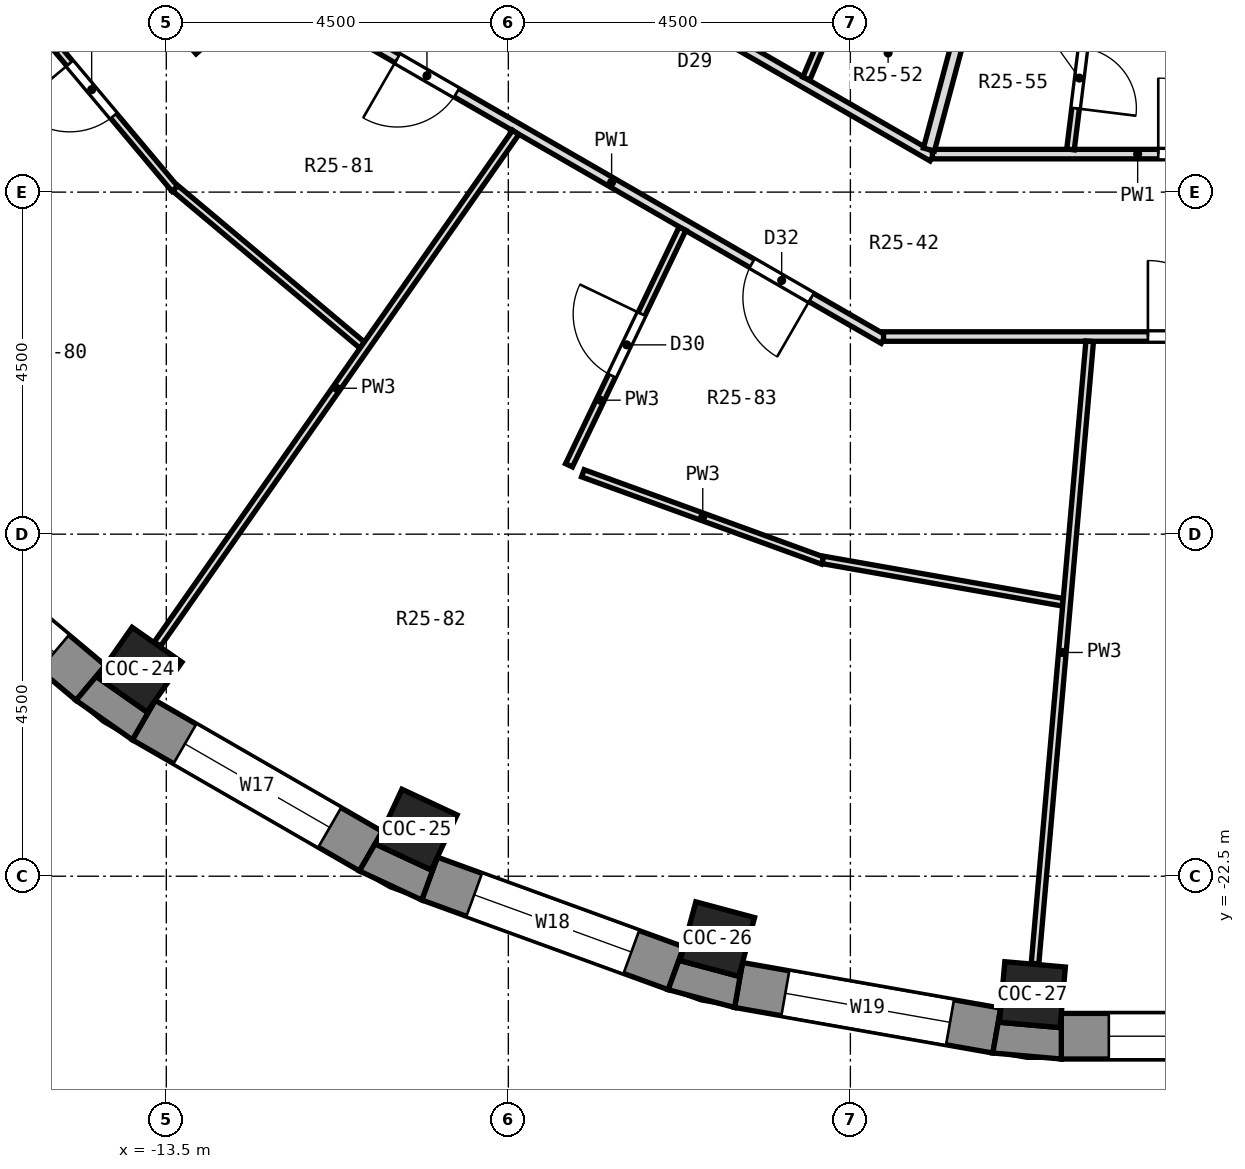
"""IFC4 building model, lengths in metres.
Left out: names, types, materials, properties, quantities, classifications, styles, units other than length and angle.
Written with IfcOpenShell. Run it as: python <this file> out.ifc"""

import sys

from ifc_helpers import new_model, si_unit, direction, frame, frame_2d, origin, origin_2d, place, context, subcontext, project, spatial, polyline, rectangle, outline, extrude, element, fill, save


model = new_model("IFC4")
c1 = context("Model", 3, precision=1e-05, world=origin(), true_north=direction((0.0, 1.0)))
c2 = subcontext(c1, "Body", "Model", "MODEL_VIEW")
j1 = project(units=[si_unit("LENGTHUNIT", "METRE"), si_unit("PLANEANGLEUNIT", "RADIAN")], contexts=[c1])
p1 = place(None, origin())
s1 = spatial("IfcSite", under=j1, at=p1, CompositionType="ELEMENT")
p2 = place(p1, origin())
s2 = spatial("IfcBuilding", under=s1, at=p2, CompositionType="ELEMENT")
p3 = place(p2, frame((0.0, 0.0, 160.8)))
s3 = spatial("IfcBuildingStorey", under=s2, at=p3, CompositionType="ELEMENT", Elevation=160.8)
for number, where, z_axis, x_axis in (
    (1, (-13.852, -19.782, 0.0), (0.0, 0.0, 1.0), (-0.574, -0.819, 0.0)),
    (2, (-10.206, -21.887, 0.0), (0.0, 0.0, 1.0), (-0.423, -0.906, 0.0)),
    (3, (-6.25, -23.327, 0.0), (0.0, 0.0, 1.0), (-0.259, -0.966, 0.0)),
    (4, (-2.105, -24.058, 0.0), (0.0, 0.0, 1.0), (-0.087, -0.996, 0.0)),
):
    element("IfcColumn", number, at=place(p3, frame(where, z_axis=z_axis, x_axis=x_axis)), inside=s3, PredefinedType="COLUMN", context=c2, shape_type="SweptSolid", body=[
        extrude(rectangle(XDim=0.8, YDim=0.8, at=origin_2d()), origin(), (0.0, 0.0, 1.0), 3.3),
    ])
p4 = place(p3, frame((-17.137, -17.74, 0.0), z_axis=(0.0, 0.0, 1.0), x_axis=(0.766058884809, -0.642770398358, 0.0)))
e5 = element("IfcWall", 5, at=p4, inside=s3, PredefinedType="SOLIDWALL", context=c2, shape_type="SweptSolid", body=[
    extrude(rectangle(XDim=3.449, YDim=0.6, at=frame_2d((1.725, 0.0))), origin(), (0.0, 0.0, 1.0), 2.85),
])
p5 = place(p4, frame((0.625, 0.0, 0.9)))
e6 = element("IfcOpeningElement", 6, at=p5, cuts=e5, PredefinedType="OPENING", context=c2, shape_type="SweptSolid", body=[
    extrude(rectangle(XDim=2.2, YDim=1.8, at=frame_2d((1.1, 0.9))), frame((0.0, 0.312, 0.0), z_axis=(0.0, -1.0, 0.0), x_axis=(1.0, 0.0, 0.0)), (0.0, 0.0, 1.0), 0.624),
])
p6 = place(p3, frame((-13.796, -20.446, 0.0), z_axis=(0.0, 0.0, 1.0), x_axis=(0.86602648383, -0.499998129301, 0.0)))
e7 = element("IfcWall", 7, at=p6, inside=s3, PredefinedType="SOLIDWALL", context=c2, shape_type="SweptSolid", body=[
    extrude(rectangle(XDim=3.45, YDim=0.6, at=frame_2d((1.725, 0.0))), origin(), (0.0, 0.0, 1.0), 2.85),
])
p7 = place(p6, frame((0.625, 0.0, 0.9)))
e8 = element("IfcOpeningElement", 8, at=p7, cuts=e7, PredefinedType="OPENING", context=c2, shape_type="SweptSolid", body=[
    extrude(rectangle(XDim=2.2, YDim=1.8, at=frame_2d((1.1, 0.9))), frame((0.0, 0.312, 0.0), z_axis=(0.0, -1.0, 0.0), x_axis=(1.0, 0.0, 0.0)), (0.0, 0.0, 1.0), 0.624),
])
p8 = place(p3, frame((-10.036, -22.531, 0.0), z_axis=(0.0, 0.0, 1.0), x_axis=(0.93968799822, -0.342032843455, 0.0)))
e9 = element("IfcWall", 9, at=p8, inside=s3, PredefinedType="SOLIDWALL", context=c2, shape_type="SweptSolid", body=[
    extrude(rectangle(XDim=3.45, YDim=0.6, at=frame_2d((1.725, 0.0))), origin(), (0.0, 0.0, 1.0), 2.85),
])
p9 = place(p8, frame((0.625, 0.0, 0.9)))
e10 = element("IfcOpeningElement", 10, at=p9, cuts=e9, PredefinedType="OPENING", context=c2, shape_type="SweptSolid", body=[
    extrude(rectangle(XDim=2.2, YDim=1.8, at=frame_2d((1.1, 0.9))), frame((0.0, 0.312, 0.0), z_axis=(0.0, -1.0, 0.0), x_axis=(1.0, 0.0, 0.0)), (0.0, 0.0, 1.0), 0.624),
])
p10 = place(p3, frame((-5.971, -23.932, 0.0), z_axis=(0.0, 0.0, 1.0), x_axis=(0.984814892183, -0.173607684551, 0.0)))
e11 = element("IfcWall", 11, at=p10, inside=s3, PredefinedType="SOLIDWALL", context=c2, shape_type="SweptSolid", body=[
    extrude(rectangle(XDim=3.45, YDim=0.6, at=frame_2d((1.725, 0.0))), origin(), (0.0, 0.0, 1.0), 2.85),
])
p11 = place(p10, frame((0.625, 0.0, 0.9)))
e12 = element("IfcOpeningElement", 12, at=p11, cuts=e11, PredefinedType="OPENING", context=c2, shape_type="SweptSolid", body=[
    extrude(rectangle(XDim=2.2, YDim=1.8, at=frame_2d((1.1, 0.9))), frame((0.0, 0.312, 0.0), z_axis=(0.0, -1.0, 0.0), x_axis=(1.0, 0.0, 0.0)), (0.0, 0.0, 1.0), 0.624),
])
p12 = place(p3, frame((-1.725, -24.605, 0.0), z_axis=(0.0, 0.0, 1.0), x_axis=(1.0, 0.0, 0.0)))
e13 = element("IfcWall", 13, at=p12, inside=s3, PredefinedType="SOLIDWALL", context=c2, shape_type="SweptSolid", body=[
    extrude(rectangle(XDim=3.45, YDim=0.6, at=frame_2d((1.725, 0.0))), origin(), (0.0, 0.0, 1.0), 2.85),
])
p13 = place(p12, frame((0.625, 0.0, 0.9)))
e14 = element("IfcOpeningElement", 14, at=p13, cuts=e13, PredefinedType="OPENING", context=c2, shape_type="SweptSolid", body=[
    extrude(rectangle(XDim=2.2, YDim=1.8, at=frame_2d((1.1, 0.9))), frame((0.0, 0.312, 0.0), z_axis=(0.0, -1.0, 0.0), x_axis=(1.0, 0.0, 0.0)), (0.0, 0.0, 1.0), 0.624),
])
p14 = place(p3, origin())
e15 = element("IfcWall", 15, at=p14, inside=s3, PredefinedType="SOLIDWALL", context=c2, shape_type="SweptSolid", body=[
    extrude(outline(polyline([(-14.687, -20.187), (-13.946, -20.706), (-13.646, -20.186), (-13.754, -20.34), (-14.409, -19.881), (-14.302, -19.727), (-14.687, -20.187)])), origin(), (0.0, 0.0, 1.0), 2.85),
])
p15 = place(p3, origin())
e16 = element("IfcWall", 16, at=p15, inside=s3, PredefinedType="SOLIDWALL", context=c2, shape_type="SweptSolid", body=[
    extrude(outline(polyline([(-10.139, -22.813), (-9.934, -22.249), (-10.013, -22.419), (-10.738, -22.081), (-10.659, -21.911), (-10.959, -22.431), (-10.139, -22.813)])), origin(), (0.0, 0.0, 1.0), 2.85),
])
p16 = place(p3, origin())
e17 = element("IfcWall", 17, at=p16, inside=s3, PredefinedType="SOLIDWALL", context=c2, shape_type="SweptSolid", body=[
    extrude(outline(polyline([(-6.023, -24.227), (-5.919, -23.636), (-5.968, -23.817), (-6.74, -23.61), (-6.692, -23.429), (-6.897, -23.993), (-6.023, -24.227)])), origin(), (0.0, 0.0, 1.0), 2.85),
])
p17 = place(p3, origin())
e18 = element("IfcWall", 18, at=p17, inside=s3, PredefinedType="SOLIDWALL", context=c2, shape_type="SweptSolid", body=[
    extrude(outline(polyline([(-2.626, -24.826), (-1.725, -24.905), (-1.725, -24.305), (-1.741, -24.491), (-2.538, -24.422), (-2.522, -24.235), (-2.626, -24.826)])), origin(), (0.0, 0.0, 1.0), 2.85),
])
p18 = place(p3, frame((-15.545, -10.885, 0.0), z_axis=(0.0, 0.0, 1.0), x_axis=(0.642690725871, -0.766125727854, 0.0)))
e19 = element("IfcWall", 19, at=p18, inside=s3, PredefinedType="PARTITIONING", context=c2, shape_type="SweptSolid", body=[
    extrude(rectangle(XDim=3.358, YDim=0.1, at=frame_2d((1.679, 0.0))), origin(), (0.0, 0.0, 1.0), 2.85),
])
p19 = place(p18, frame((1.204, 0.0, 0.0)))
e20 = element("IfcOpeningElement", 20, at=p19, cuts=e19, PredefinedType="OPENING", context=c2, shape_type="SweptSolid", body=[
    extrude(rectangle(XDim=0.9, YDim=2.1, at=frame_2d((0.45, 1.05))), frame((0.0, 0.062, 0.0), z_axis=(0.0, -1.0, 0.0), x_axis=(1.0, 0.0, 0.0)), (0.0, 0.0, 1.0), 0.124),
])
p20 = place(p3, frame((-13.381, -13.451, 0.0), z_axis=(0.0, 0.0, 1.0), x_axis=(0.766064597799, -0.642763589509, 0.0)))
e21 = element("IfcWall", 21, at=p20, inside=s3, PredefinedType="PARTITIONING", context=c2, shape_type="SweptSolid", body=[
    extrude(rectangle(XDim=3.208, YDim=0.1, at=frame_2d((1.604, 0.0))), origin(), (0.0, 0.0, 1.0), 2.85),
])
p21 = place(p3, frame((-11.22, -11.305, 0.0), z_axis=(0.0, 0.0, 1.0), x_axis=(0.866074891173, -0.499914275531, 0.0)))
e22 = element("IfcWall", 22, at=p21, inside=s3, PredefinedType="PARTITIONING", context=c2, shape_type="SweptSolid", body=[
    extrude(rectangle(XDim=8.263, YDim=0.125, at=frame_2d((4.132, 0.0))), origin(), (0.0, 0.0, 1.0), 2.85),
])
p22 = place(p21, frame((0.877, 0.0, 0.0)))
e23 = element("IfcOpeningElement", 23, at=p22, cuts=e22, PredefinedType="OPENING", context=c2, shape_type="SweptSolid", body=[
    extrude(rectangle(XDim=0.9, YDim=2.1, at=frame_2d((0.45, 1.05))), frame((0.0, 0.074, 0.0), z_axis=(0.0, -1.0, 0.0), x_axis=(1.0, 0.0, 0.0)), (0.0, 0.0, 1.0), 0.149),
])
p23 = place(p21, frame((6.265, 0.0, 0.0)))
e24 = element("IfcOpeningElement", 24, at=p23, cuts=e22, PredefinedType="OPENING", context=c2, shape_type="SweptSolid", body=[
    extrude(rectangle(XDim=0.9, YDim=2.1, at=frame_2d((0.45, 1.05))), frame((0.0, 0.074, 0.0), z_axis=(0.0, -1.0, 0.0), x_axis=(1.0, 0.0, 0.0)), (0.0, 0.0, 1.0), 0.149),
])
p24 = place(p3, frame((-9.463, -9.548, 0.0), z_axis=(0.0, 0.0, 1.0), x_axis=(0.866077207726, -0.499910262205, 0.0)))
e25 = element("IfcWall", 25, at=p24, inside=s3, PredefinedType="PARTITIONING", context=c2, shape_type="SweptSolid", body=[
    extrude(rectangle(XDim=6.977, YDim=0.125, at=frame_2d((3.488, 0.0))), origin(), (0.0, 0.0, 1.0), 2.85),
])
p25 = place(p24, frame((2.87, 0.0, 0.0)))
e26 = element("IfcOpeningElement", 26, at=p25, cuts=e25, PredefinedType="OPENING", context=c2, shape_type="SweptSolid", body=[
    extrude(rectangle(XDim=1.0, YDim=2.1, at=frame_2d((0.5, 1.05))), frame((0.0, 0.074, 0.0), z_axis=(0.0, -1.0, 0.0), x_axis=(1.0, 0.0, 0.0)), (0.0, 0.0, 1.0), 0.149),
])
p26 = place(p3, frame((-8.02, -17.199, 0.0), z_axis=(0.0, 0.0, 1.0), x_axis=(0.939708490433, -0.341976538681, 0.0)))
e27 = element("IfcWall", 27, at=p26, inside=s3, PredefinedType="PARTITIONING", context=c2, shape_type="SweptSolid", body=[
    extrude(rectangle(XDim=3.358, YDim=0.1, at=frame_2d((1.679, 0.0))), origin(), (0.0, 0.0, 1.0), 2.85),
])
p27 = place(p3, frame((-4.863, -18.339, 0.0), z_axis=(0.0, 0.0, 1.0), x_axis=(0.984782026727, -0.173794015534, 0.0)))
e28 = element("IfcWall", 28, at=p27, inside=s3, PredefinedType="PARTITIONING", context=c2, shape_type="SweptSolid", body=[
    extrude(rectangle(XDim=3.208, YDim=0.1, at=frame_2d((1.604, 0.0))), origin(), (0.0, 0.0, 1.0), 2.85),
])
p28 = place(p3, frame((-4.063, -15.4, 0.0), z_axis=(0.0, 0.0, 1.0), x_axis=(1.0, 0.0, 0.0)))
e29 = element("IfcWall", 29, at=p28, inside=s3, PredefinedType="PARTITIONING", context=c2, shape_type="SweptSolid", body=[
    extrude(rectangle(XDim=8.262, YDim=0.125, at=frame_2d((4.131, 0.0))), origin(), (0.0, 0.0, 1.0), 2.85),
])
p29 = place(p28, frame((3.478, 0.0, 0.0)))
e30 = element("IfcOpeningElement", 30, at=p29, cuts=e29, PredefinedType="OPENING", context=c2, shape_type="SweptSolid", body=[
    extrude(rectangle(XDim=1.0, YDim=2.1, at=frame_2d((0.5, 1.05))), frame((0.0, 0.074, 0.0), z_axis=(0.0, -1.0, 0.0), x_axis=(1.0, 0.0, 0.0)), (0.0, 0.0, 1.0), 0.149),
])
p30 = place(p28, frame((6.264, 0.0, 0.0)))
e31 = element("IfcOpeningElement", 31, at=p30, cuts=e29, PredefinedType="OPENING", context=c2, shape_type="SweptSolid", body=[
    extrude(rectangle(XDim=0.9, YDim=2.1, at=frame_2d((0.45, 1.05))), frame((0.0, 0.074, 0.0), z_axis=(0.0, -1.0, 0.0), x_axis=(1.0, 0.0, 0.0)), (0.0, 0.0, 1.0), 0.149),
])
p31 = place(p3, frame((-3.42, -13.0, 0.0), z_axis=(0.0, 0.0, 1.0), x_axis=(1.0, 0.0, 0.0)))
e32 = element("IfcWall", 32, at=p31, inside=s3, PredefinedType="PARTITIONING", context=c2, shape_type="SweptSolid", body=[
    extrude(rectangle(XDim=6.99, YDim=0.125, at=frame_2d((3.495, 0.0))), origin(), (0.0, 0.0, 1.0), 2.85),
])
p32 = place(p31, frame((2.971, 0.0, 0.0)))
e33 = element("IfcOpeningElement", 33, at=p32, cuts=e32, PredefinedType="OPENING", context=c2, shape_type="SweptSolid", body=[
    extrude(rectangle(XDim=1.0, YDim=2.1, at=frame_2d((0.5, 1.05))), frame((0.0, 0.074, 0.0), z_axis=(0.0, -1.0, 0.0), x_axis=(1.0, 0.0, 0.0)), (0.0, 0.0, 1.0), 0.149),
])
p33 = place(p3, frame((-13.15, -11.634, 0.0), z_axis=(0.0, 0.0, 1.0), x_axis=(0.748988708904, 0.662582760065, 0.0)))
e34 = element("IfcWall", 34, at=p33, inside=s3, PredefinedType="PARTITIONING", context=c2, shape_type="SweptSolid", body=[
    extrude(rectangle(XDim=1.78, YDim=0.125, at=frame_2d((0.89, 0.0))), origin(), (0.0, 0.0, 1.0), 2.85),
])
p34 = place(p3, frame((-13.617, -19.447, 0.0), z_axis=(0.0, 0.0, 1.0), x_axis=(0.573585951544, 0.819145381597, 0.0)))
e35 = element("IfcWall", 35, at=p34, inside=s3, PredefinedType="PARTITIONING", context=c2, shape_type="SweptSolid", body=[
    extrude(rectangle(XDim=8.218, YDim=0.1, at=frame_2d((4.109, 0.0))), origin(), (0.0, 0.0, 1.0), 2.85),
])
p35 = place(p3, frame((-8.202, -17.094, 0.0), z_axis=(0.0, 0.0, 1.0), x_axis=(0.432471241397, 0.901647727976, 0.0)))
e36 = element("IfcWall", 36, at=p35, inside=s3, PredefinedType="PARTITIONING", context=c2, shape_type="SweptSolid", body=[
    extrude(rectangle(XDim=3.452, YDim=0.1, at=frame_2d((1.726, 0.0))), origin(), (0.0, 0.0, 1.0), 2.85),
])
p36 = place(p35, frame((1.307, 0.0, 0.0)))
e37 = element("IfcOpeningElement", 37, at=p36, cuts=e36, PredefinedType="OPENING", context=c2, shape_type="SweptSolid", body=[
    extrude(rectangle(XDim=0.9, YDim=2.1, at=frame_2d((0.45, 1.05))), frame((0.0, 0.062, 0.0), z_axis=(0.0, -1.0, 0.0), x_axis=(1.0, 0.0, 0.0)), (0.0, 0.0, 1.0), 0.124),
])
p37 = place(p3, frame((-5.08, -12.006, 0.0), z_axis=(0.0, 0.0, 1.0), x_axis=(0.389593941569, 0.920986732094, 0.0)))
e38 = element("IfcWall", 38, at=p37, inside=s3, PredefinedType="PARTITIONING", context=c2, shape_type="SweptSolid", body=[
    extrude(rectangle(XDim=1.903, YDim=0.1, at=frame_2d((0.951, 0.0))), origin(), (0.0, 0.0, 1.0), 2.85),
])
p38 = place(p37, frame((0.545, 0.0, 0.0)))
e39 = element("IfcOpeningElement", 39, at=p38, cuts=e38, PredefinedType="OPENING", context=c2, shape_type="SweptSolid", body=[
    extrude(rectangle(XDim=0.8, YDim=2.1, at=frame_2d((0.4, 1.05))), frame((0.0, 0.062, 0.0), z_axis=(0.0, -1.0, 0.0), x_axis=(1.0, 0.0, 0.0)), (0.0, 0.0, 1.0), 0.124),
])
p39 = place(p3, frame((-3.467, -12.94, 0.0), z_axis=(0.0, 0.0, 1.0), x_axis=(0.258732959093, 0.965948888854, 0.0)))
e40 = element("IfcWall", 40, at=p39, inside=s3, PredefinedType="PARTITIONING", context=c2, shape_type="SweptSolid", body=[
    extrude(rectangle(XDim=3.904, YDim=0.15, at=frame_2d((1.952, 0.0))), origin(), (0.0, 0.0, 1.0), 2.85),
])
p40 = place(p3, frame((-1.604, -12.938, 0.0), z_axis=(0.0, 0.0, 1.0), x_axis=(0.123039852559, 0.992401730491, 0.0)))
e41 = element("IfcWall", 41, at=p40, inside=s3, PredefinedType="PARTITIONING", context=c2, shape_type="SweptSolid", body=[
    extrude(rectangle(XDim=1.903, YDim=0.1, at=frame_2d((0.951, 0.0))), origin(), (0.0, 0.0, 1.0), 2.85),
])
p41 = place(p40, frame((0.545, 0.0, 0.0)))
e42 = element("IfcOpeningElement", 42, at=p41, cuts=e41, PredefinedType="OPENING", context=c2, shape_type="SweptSolid", body=[
    extrude(rectangle(XDim=0.8, YDim=2.1, at=frame_2d((0.4, 1.05))), frame((0.0, 0.062, 0.0), z_axis=(0.0, -1.0, 0.0), x_axis=(1.0, 0.0, 0.0)), (0.0, 0.0, 1.0), 0.124),
])
p42 = place(p3, frame((-2.071, -23.649, 0.0), z_axis=(0.0, 0.0, 1.0), x_axis=(0.087543554658, 0.996160692879, 0.0)))
e43 = element("IfcWall", 43, at=p42, inside=s3, PredefinedType="PARTITIONING", context=c2, shape_type="SweptSolid", body=[
    extrude(rectangle(XDim=8.219, YDim=0.1, at=frame_2d((4.109, 0.0))), origin(), (0.0, 0.0, 1.0), 2.85),
])
p43 = place(p5, origin())
e44 = element("IfcWindow", 44, at=p43, inside=s3, PartitioningType="SINGLE_PANEL", PredefinedType="WINDOW", context=c2, shape_type="SweptSolid", body=[
    extrude(rectangle(XDim=2.2, YDim=1.8, at=frame_2d((1.1, 0.9))), frame((0.0, 0.18, 0.0), z_axis=(0.0, -1.0, 0.0), x_axis=(1.0, 0.0, 0.0)), (0.0, 0.0, 1.0), 0.06),
])
fill(e6, e44)
p44 = place(p7, origin())
e45 = element("IfcWindow", 45, at=p44, inside=s3, PartitioningType="SINGLE_PANEL", PredefinedType="WINDOW", context=c2, shape_type="SweptSolid", body=[
    extrude(rectangle(XDim=2.2, YDim=1.8, at=frame_2d((1.1, 0.9))), frame((0.0, 0.18, 0.0), z_axis=(0.0, -1.0, 0.0), x_axis=(1.0, 0.0, 0.0)), (0.0, 0.0, 1.0), 0.06),
])
fill(e8, e45)
p45 = place(p9, origin())
e46 = element("IfcWindow", 46, at=p45, inside=s3, PartitioningType="SINGLE_PANEL", PredefinedType="WINDOW", context=c2, shape_type="SweptSolid", body=[
    extrude(rectangle(XDim=2.2, YDim=1.8, at=frame_2d((1.1, 0.9))), frame((0.0, 0.18, 0.0), z_axis=(0.0, -1.0, 0.0), x_axis=(1.0, 0.0, 0.0)), (0.0, 0.0, 1.0), 0.06),
])
fill(e10, e46)
p46 = place(p11, origin())
e47 = element("IfcWindow", 47, at=p46, inside=s3, PartitioningType="SINGLE_PANEL", PredefinedType="WINDOW", context=c2, shape_type="SweptSolid", body=[
    extrude(rectangle(XDim=2.2, YDim=1.8, at=frame_2d((1.1, 0.9))), frame((0.0, 0.18, 0.0), z_axis=(0.0, -1.0, 0.0), x_axis=(1.0, 0.0, 0.0)), (0.0, 0.0, 1.0), 0.06),
])
fill(e12, e47)
p47 = place(p13, origin())
e48 = element("IfcWindow", 48, at=p47, inside=s3, PartitioningType="SINGLE_PANEL", PredefinedType="WINDOW", context=c2, shape_type="SweptSolid", body=[
    extrude(rectangle(XDim=2.2, YDim=1.8, at=frame_2d((1.1, 0.9))), frame((0.0, 0.18, 0.0), z_axis=(0.0, -1.0, 0.0), x_axis=(1.0, 0.0, 0.0)), (0.0, 0.0, 1.0), 0.06),
])
fill(e14, e48)
p48 = place(p19, frame((0.9, 0.0, 0.0), z_axis=(0.0, 0.0, 1.0), x_axis=(-1.0, 0.0, 0.0)))
e49 = element("IfcDoor", 49, at=p48, inside=s3, OperationType="SINGLE_SWING_RIGHT", PredefinedType="DOOR", context=c2, shape_type="SweptSolid", body=[
    extrude(rectangle(XDim=0.9, YDim=2.1, at=frame_2d((0.45, 1.05))), frame((0.0, 0.025, 0.0), z_axis=(0.0, -1.0, 0.0), x_axis=(1.0, 0.0, 0.0)), (0.0, 0.0, 1.0), 0.05),
])
fill(e20, e49)
p49 = place(p22, frame((0.9, 0.0, 0.0), z_axis=(0.0, 0.0, 1.0), x_axis=(-1.0, 0.0, 0.0)))
e50 = element("IfcDoor", 50, at=p49, inside=s3, OperationType="SINGLE_SWING_RIGHT", PredefinedType="DOOR", context=c2, shape_type="SweptSolid", body=[
    extrude(rectangle(XDim=0.9, YDim=2.1, at=frame_2d((0.45, 1.05))), frame((0.0, 0.025, 0.0), z_axis=(0.0, -1.0, 0.0), x_axis=(1.0, 0.0, 0.0)), (0.0, 0.0, 1.0), 0.05),
])
fill(e23, e50)
p50 = place(p36, origin())
e51 = element("IfcDoor", 51, at=p50, inside=s3, OperationType="SINGLE_SWING_RIGHT", PredefinedType="DOOR", context=c2, shape_type="SweptSolid", body=[
    extrude(rectangle(XDim=0.9, YDim=2.1, at=frame_2d((0.45, 1.05))), frame((0.0, 0.025, 0.0), z_axis=(0.0, -1.0, 0.0), x_axis=(1.0, 0.0, 0.0)), (0.0, 0.0, 1.0), 0.05),
])
fill(e37, e51)
p51 = place(p23, frame((0.9, 0.0, 0.0), z_axis=(0.0, 0.0, 1.0), x_axis=(-1.0, 0.0, 0.0)))
e52 = element("IfcDoor", 52, at=p51, inside=s3, OperationType="SINGLE_SWING_LEFT", PredefinedType="DOOR", context=c2, shape_type="SweptSolid", body=[
    extrude(rectangle(XDim=0.9, YDim=2.1, at=frame_2d((0.45, 1.05))), frame((0.0, 0.025, 0.0), z_axis=(0.0, -1.0, 0.0), x_axis=(1.0, 0.0, 0.0)), (0.0, 0.0, 1.0), 0.05),
])
fill(e24, e52)
p52 = place(p41, frame((0.8, 0.0, 0.0), z_axis=(0.0, 0.0, 1.0), x_axis=(-1.0, 0.0, 0.0)))
e53 = element("IfcDoor", 53, at=p52, inside=s3, OperationType="SINGLE_SWING_RIGHT", PredefinedType="DOOR", context=c2, shape_type="SweptSolid", body=[
    extrude(rectangle(XDim=0.8, YDim=2.1, at=frame_2d((0.4, 1.05))), frame((0.0, 0.025, 0.0), z_axis=(0.0, -1.0, 0.0), x_axis=(1.0, 0.0, 0.0)), (0.0, 0.0, 1.0), 0.05),
])
fill(e42, e53)
p53 = place(p29, origin())
e54 = element("IfcDoor", 54, at=p53, inside=s3, OperationType="SINGLE_SWING_LEFT", PredefinedType="DOOR", context=c2, shape_type="SweptSolid", body=[
    extrude(rectangle(XDim=1.0, YDim=2.1, at=frame_2d((0.5, 1.05))), frame((0.0, 0.025, 0.0), z_axis=(0.0, -1.0, 0.0), x_axis=(1.0, 0.0, 0.0)), (0.0, 0.0, 1.0), 0.05),
])
fill(e30, e54)
p54 = place(p32, origin())
e55 = element("IfcDoor", 55, at=p54, inside=s3, OperationType="SINGLE_SWING_LEFT", PredefinedType="DOOR", context=c2, shape_type="SweptSolid", body=[
    extrude(rectangle(XDim=1.0, YDim=2.1, at=frame_2d((0.5, 1.05))), frame((0.0, 0.025, 0.0), z_axis=(0.0, -1.0, 0.0), x_axis=(1.0, 0.0, 0.0)), (0.0, 0.0, 1.0), 0.05),
])
fill(e33, e55)
save(model, sys.argv[1])
